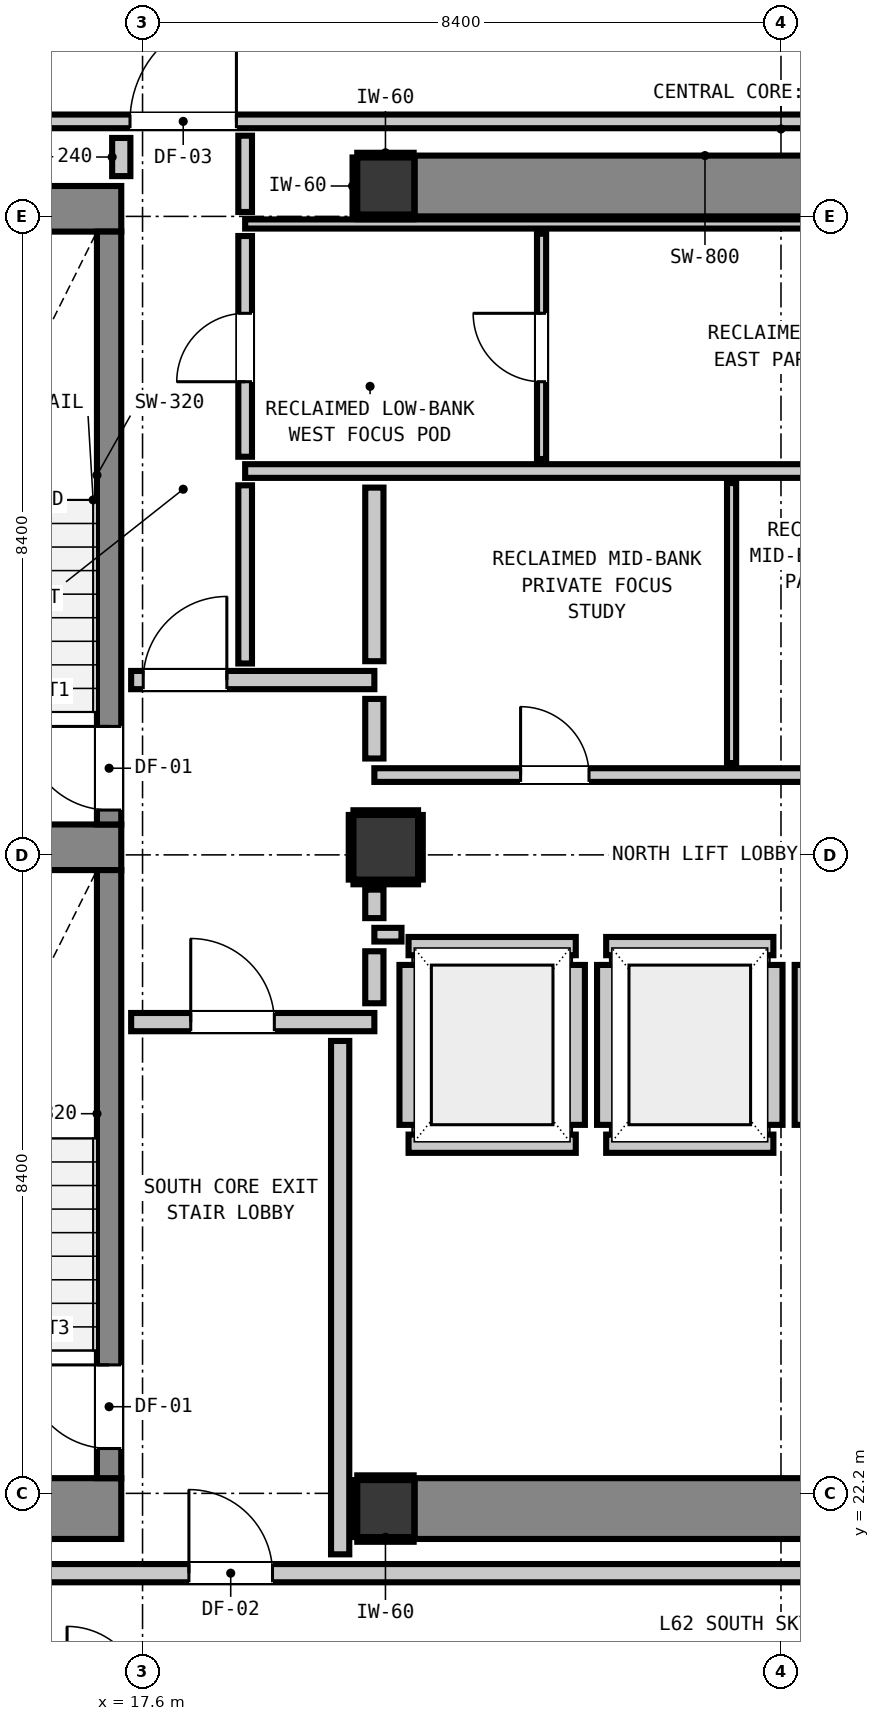
"""IFC4 building model, lengths in metres.
Left out: names, types, materials, properties, quantities, classifications, styles, units other than length and angle.
Written with IfcOpenShell. Run it as: python <this file> out.ifc"""

import sys

from ifc_helpers import new_model, si_unit, direction, frame, frame_2d, origin, origin_2d, place, context, subcontext, project, spatial, rectangle, extrude, element, fill, save


model = new_model("IFC4")
c1 = context("Model", 3, precision=1e-05, world=origin(), true_north=direction((0.0, 1.0)))
c2 = subcontext(c1, "Body", "Model", "MODEL_VIEW")
j1 = project(units=[si_unit("LENGTHUNIT", "METRE"), si_unit("PLANEANGLEUNIT", "RADIAN")], contexts=[c1])
p1 = place(None, origin())
s1 = spatial("IfcSite", under=j1, at=p1, CompositionType="ELEMENT")
p2 = place(p1, origin())
s2 = spatial("IfcBuilding", under=s1, at=p2, CompositionType="ELEMENT")
p3 = place(p2, frame((0.0, 0.0, 213.4)))
s3 = spatial("IfcBuildingStorey", under=s2, at=p3, CompositionType="ELEMENT", Elevation=213.4)
for number, where, z_axis, x_axis in (
    (1, (20.8, 22.0, 0.0), (0.0, 0.0, 1.0), (1.0, 0.0, 0.0)),
    (2, (20.8, 39.4, 0.0), (0.0, 0.0, 1.0), (1.0, 0.0, 0.0)),
):
    element("IfcColumn", number, at=place(p3, frame(where, z_axis=z_axis, x_axis=x_axis)), inside=s3, PredefinedType="COLUMN", context=c2, shape_type="SweptSolid", body=[
        extrude(rectangle(XDim=0.75, YDim=0.75, at=origin_2d()), origin(), (0.0, 0.0, 1.0), 3.32),
    ])
p4 = place(p3, frame((13.24, 22.0, 0.0), z_axis=(0.0, 0.0, 1.0), x_axis=(1.0, 0.0, 0.0)))
e3 = element("IfcWall", 3, at=p4, inside=s3, PredefinedType="SHEAR", context=c2, shape_type="SweptSolid", body=[
    extrude(rectangle(XDim=4.08, YDim=0.8, at=frame_2d((2.04, 0.0))), origin(), (0.0, 0.0, 1.0), 3.32),
])
p5 = place(p3, frame((13.24, 39.1, 0.0), z_axis=(0.0, 0.0, 1.0), x_axis=(1.0, 0.0, 0.0)))
e4 = element("IfcWall", 4, at=p5, inside=s3, PredefinedType="SHEAR", context=c2, shape_type="SweptSolid", body=[
    extrude(rectangle(XDim=4.08, YDim=0.6, at=frame_2d((2.04, 0.0))), origin(), (0.0, 0.0, 1.0), 3.32),
])
p6 = place(p3, frame((13.78, 30.7, 0.0), z_axis=(0.0, 0.0, 1.0), x_axis=(1.0, 0.0, 0.0)))
e5 = element("IfcWall", 5, at=p6, inside=s3, PredefinedType="SHEAR", context=c2, shape_type="SweptSolid", body=[
    extrude(rectangle(XDim=3.54, YDim=0.6, at=frame_2d((1.77, 0.0))), origin(), (0.0, 0.0, 1.0), 3.32),
])
for number, where, z_axis, x_axis in (
    (6, (21.18, 22.0, 0.0), (0.0, 0.0, 1.0), (1.0, 0.0, 0.0)),
    (7, (21.18, 39.4, 0.0), (0.0, 0.0, 1.0), (1.0, 0.0, 0.0)),
):
    element("IfcWall", number, at=place(p3, frame(where, z_axis=z_axis, x_axis=x_axis)), inside=s3, PredefinedType="SHEAR", context=c2, shape_type="SweptSolid", body=[
        extrude(rectangle(XDim=7.64, YDim=0.8, at=frame_2d((3.82, 0.0))), origin(), (0.0, 0.0, 1.0), 3.32),
    ])
p7 = place(p3, frame((17.16, 31.0, 0.0), z_axis=(0.0, 0.0, 1.0), x_axis=(0.0, 1.0, 0.0)))
e8 = element("IfcWall", 8, at=p7, inside=s3, PredefinedType="SHEAR", context=c2, shape_type="SweptSolid", body=[
    extrude(rectangle(XDim=7.8, YDim=0.32, at=frame_2d((3.9, 0.0))), origin(), (0.0, 0.0, 1.0), 3.32),
])
p8 = place(p7, frame((0.19, 0.0, 0.0)))
e9 = element("IfcOpeningElement", 9, at=p8, cuts=e8, PredefinedType="OPENING", context=c2, shape_type="SweptSolid", body=[
    extrude(rectangle(XDim=1.1, YDim=2.15, at=frame_2d((0.55, 1.075))), frame((0.0, 0.17, 0.0), z_axis=(0.0, -1.0, 0.0), x_axis=(1.0, 0.0, 0.0)), (0.0, 0.0, 1.0), 0.34),
])
p9 = place(p3, frame((17.16, 22.4, 0.0), z_axis=(0.0, 0.0, 1.0), x_axis=(0.0, 1.0, 0.0)))
e10 = element("IfcWall", 10, at=p9, inside=s3, PredefinedType="SHEAR", context=c2, shape_type="SweptSolid", body=[
    extrude(rectangle(XDim=8.0, YDim=0.32, at=frame_2d((4.0, 0.0))), origin(), (0.0, 0.0, 1.0), 3.32),
])
p10 = place(p9, frame((0.39, 0.0, 0.0)))
e11 = element("IfcOpeningElement", 11, at=p10, cuts=e10, PredefinedType="OPENING", context=c2, shape_type="SweptSolid", body=[
    extrude(rectangle(XDim=1.1, YDim=2.15, at=frame_2d((0.55, 1.075))), frame((0.0, 0.17, 0.0), z_axis=(0.0, -1.0, 0.0), x_axis=(1.0, 0.0, 0.0)), (0.0, 0.0, 1.0), 0.34),
])
p11 = place(p3, frame((20.8, 30.7, 0.0), z_axis=(0.0, 0.0, 1.0), x_axis=(1.0, 0.0, 0.0)))
e12 = element("IfcColumn", 12, at=p11, inside=s3, PredefinedType="COLUMN", context=c2, shape_type="SweptSolid", body=[
    extrude(rectangle(XDim=0.85, YDim=0.85, at=origin_2d()), origin(), (0.0, 0.0, 1.0), 3.32),
])
for number, where, z_axis, x_axis in (
    (13, (21.1, 26.8, 0.0), (0.0, 0.0, 1.0), (1.0, 0.0, 0.0)),
    (14, (21.1, 29.4, 0.0), (0.0, 0.0, 1.0), (1.0, 0.0, 0.0)),
):
    element("IfcWall", number, at=place(p3, frame(where, z_axis=z_axis, x_axis=x_axis)), inside=s3, PredefinedType="PARTITIONING", context=c2, shape_type="SweptSolid", body=[
        extrude(rectangle(XDim=2.2, YDim=0.24, at=frame_2d((1.1, 0.0))), origin(), (0.0, 0.0, 1.0), 3.1),
    ])
p12 = place(p3, frame((21.1, 27.048, 0.0), z_axis=(0.0, 0.0, 1.0), x_axis=(0.0, 1.0, 0.0)))
e15 = element("IfcWall", 15, at=p12, inside=s3, PredefinedType="PARTITIONING", context=c2, shape_type="SweptSolid", body=[
    extrude(rectangle(XDim=2.104, YDim=0.24, at=frame_2d((1.052, 0.0))), origin(), (0.0, 0.0, 1.0), 2.335),
])
p13 = place(p3, frame((23.3, 27.048, 0.0), z_axis=(0.0, 0.0, 1.0), x_axis=(0.0, 1.0, 0.0)))
e16 = element("IfcWall", 16, at=p13, inside=s3, PredefinedType="PARTITIONING", context=c2, shape_type="SweptSolid", body=[
    extrude(rectangle(XDim=2.104, YDim=0.24, at=frame_2d((1.052, 0.0))), origin(), (0.0, 0.0, 1.0), 3.1),
])
for number, where, z_axis, x_axis in (
    (17, (23.7, 26.8, 0.0), (0.0, 0.0, 1.0), (1.0, 0.0, 0.0)),
    (18, (23.7, 29.4, 0.0), (0.0, 0.0, 1.0), (1.0, 0.0, 0.0)),
):
    element("IfcWall", number, at=place(p3, frame(where, z_axis=z_axis, x_axis=x_axis)), inside=s3, PredefinedType="PARTITIONING", context=c2, shape_type="SweptSolid", body=[
        extrude(rectangle(XDim=2.2, YDim=0.24, at=frame_2d((1.1, 0.0))), origin(), (0.0, 0.0, 1.0), 3.1),
    ])
for number, where, z_axis, x_axis in (
    (19, (23.7, 27.048, 0.0), (0.0, 0.0, 1.0), (0.0, 1.0, 0.0)),
    (20, (25.9, 27.048, 0.0), (0.0, 0.0, 1.0), (0.0, 1.0, 0.0)),
    (21, (26.3, 27.048, 0.0), (0.0, 0.0, 1.0), (0.0, 1.0, 0.0)),
):
    element("IfcWall", number, at=place(p3, frame(where, z_axis=z_axis, x_axis=x_axis)), inside=s3, PredefinedType="PARTITIONING", context=c2, shape_type="SweptSolid", body=[
        extrude(rectangle(XDim=2.104, YDim=0.24, at=frame_2d((1.052, 0.0))), origin(), (0.0, 0.0, 1.0), 3.1),
    ])
p14 = place(p3, frame((10.787, 21.15, 0.0), z_axis=(0.0, 0.0, 1.0), x_axis=(1.0, 0.0, 0.0)))
e22 = element("IfcWall", 22, at=p14, inside=s3, PredefinedType="PARTITIONING", context=c2, shape_type="SweptSolid", body=[
    extrude(rectangle(XDim=36.626, YDim=0.24, at=frame_2d((18.313, 0.0))), origin(), (0.0, 0.0, 1.0), 3.1),
])
p15 = place(p14, frame((7.423, 0.0, 0.0)))
e23 = element("IfcOpeningElement", 23, at=p15, cuts=e22, PredefinedType="OPENING", context=c2, shape_type="SweptSolid", body=[
    extrude(rectangle(XDim=1.1, YDim=2.15, at=frame_2d((0.55, 1.075))), frame((0.0, 0.13, 0.0), z_axis=(0.0, -1.0, 0.0), x_axis=(1.0, 0.0, 0.0)), (0.0, 0.0, 1.0), 0.26),
])
p16 = place(p14, frame((31.314, 0.0, 0.0)))
e24 = element("IfcOpeningElement", 24, at=p16, cuts=e22, PredefinedType="OPENING", context=c2, shape_type="SweptSolid", body=[
    extrude(rectangle(XDim=0.9, YDim=2.1, at=frame_2d((0.45, 1.05))), frame((0.0, 0.13, 0.0), z_axis=(0.0, -1.0, 0.0), x_axis=(1.0, 0.0, 0.0)), (0.0, 0.0, 1.0), 0.26),
])
p17 = place(p3, frame((17.45, 28.4, 0.0), z_axis=(0.0, 0.0, 1.0), x_axis=(1.0, 0.0, 0.0)))
e25 = element("IfcWall", 25, at=p17, inside=s3, PredefinedType="PARTITIONING", context=c2, shape_type="SweptSolid", body=[
    extrude(rectangle(XDim=3.2, YDim=0.24, at=frame_2d((1.6, 0.0))), origin(), (0.0, 0.0, 1.0), 3.1),
])
p18 = place(p17, frame((0.784, 0.0, 0.0)))
e26 = element("IfcOpeningElement", 26, at=p18, cuts=e25, PredefinedType="OPENING", context=c2, shape_type="SweptSolid", body=[
    extrude(rectangle(XDim=1.1, YDim=2.15, at=frame_2d((0.55, 1.075))), frame((0.0, 0.13, 0.0), z_axis=(0.0, -1.0, 0.0), x_axis=(1.0, 0.0, 0.0)), (0.0, 0.0, 1.0), 0.26),
])
p19 = place(p3, frame((17.45, 32.9, 0.0), z_axis=(0.0, 0.0, 1.0), x_axis=(1.0, 0.0, 0.0)))
e27 = element("IfcWall", 27, at=p19, inside=s3, PredefinedType="PARTITIONING", context=c2, shape_type="SweptSolid", body=[
    extrude(rectangle(XDim=3.2, YDim=0.24, at=frame_2d((1.6, 0.0))), origin(), (0.0, 0.0, 1.0), 3.1),
])
p20 = place(p19, frame((0.159, 0.0, 0.0)))
e28 = element("IfcOpeningElement", 28, at=p20, cuts=e27, PredefinedType="OPENING", context=c2, shape_type="SweptSolid", body=[
    extrude(rectangle(XDim=1.1, YDim=2.15, at=frame_2d((0.55, 1.075))), frame((0.0, 0.13, 0.0), z_axis=(0.0, -1.0, 0.0), x_axis=(1.0, 0.0, 0.0)), (0.0, 0.0, 1.0), 0.26),
])
p21 = place(p3, frame((20.65, 29.55, 0.0), z_axis=(0.0, 0.0, 1.0), x_axis=(1.0, 0.0, 0.0)))
e29 = element("IfcWall", 29, at=p21, inside=s3, PredefinedType="PARTITIONING", context=c2, shape_type="SweptSolid", body=[
    extrude(rectangle(XDim=0.357, YDim=0.18, at=frame_2d((0.179, 0.0))), origin(), (0.0, 0.0, 1.0), 3.1),
])
p22 = place(p3, frame((20.65, 31.65, 0.0), z_axis=(0.0, 0.0, 1.0), x_axis=(1.0, 0.0, 0.0)))
e30 = element("IfcWall", 30, at=p22, inside=s3, PredefinedType="PARTITIONING", context=c2, shape_type="SweptSolid", body=[
    extrude(rectangle(XDim=7.7, YDim=0.18, at=frame_2d((3.85, 0.0))), origin(), (0.0, 0.0, 1.0), 3.1),
])
p23 = place(p22, frame((1.924, 0.0, 0.0)))
e31 = element("IfcOpeningElement", 31, at=p23, cuts=e30, PredefinedType="OPENING", context=c2, shape_type="SweptSolid", body=[
    extrude(rectangle(XDim=0.9, YDim=2.1, at=frame_2d((0.45, 1.05))), frame((0.0, 0.1, 0.0), z_axis=(0.0, -1.0, 0.0), x_axis=(1.0, 0.0, 0.0)), (0.0, 0.0, 1.0), 0.2),
])
p24 = place(p3, frame((18.95, 35.65, 0.0), z_axis=(0.0, 0.0, 1.0), x_axis=(1.0, 0.0, 0.0)))
e32 = element("IfcWall", 32, at=p24, inside=s3, PredefinedType="PARTITIONING", context=c2, shape_type="SweptSolid", body=[
    extrude(rectangle(XDim=11.025, YDim=0.18, at=frame_2d((5.513, 0.0))), origin(), (0.0, 0.0, 1.0), 3.1),
])
p25 = place(p3, frame((10.787, 40.25, 0.0), z_axis=(0.0, 0.0, 1.0), x_axis=(1.0, 0.0, 0.0)))
e33 = element("IfcWall", 33, at=p25, inside=s3, PredefinedType="PARTITIONING", context=c2, shape_type="SweptSolid", body=[
    extrude(rectangle(XDim=26.102, YDim=0.18, at=frame_2d((13.051, 0.0))), origin(), (0.0, 0.0, 1.0), 3.1),
])
p26 = place(p25, frame((6.648, 0.0, 0.0)))
e34 = element("IfcOpeningElement", 34, at=p26, cuts=e33, PredefinedType="OPENING", context=c2, shape_type="SweptSolid", body=[
    extrude(rectangle(XDim=1.4, YDim=2.15, at=frame_2d((0.7, 1.075))), frame((0.0, 0.1, 0.0), z_axis=(0.0, -1.0, 0.0), x_axis=(1.0, 0.0, 0.0)), (0.0, 0.0, 1.0), 0.2),
])
p27 = place(p3, frame((18.95, 38.9, 0.0), z_axis=(0.0, 0.0, 1.0), x_axis=(1.0, 0.0, 0.0)))
e35 = element("IfcWall", 35, at=p27, inside=s3, PredefinedType="PARTITIONING", context=c2, shape_type="SweptSolid", body=[
    extrude(rectangle(XDim=11.025, YDim=0.12, at=frame_2d((5.513, 0.0))), origin(), (0.0, 0.0, 1.0), 3.1),
])
p28 = place(p3, frame((17.32, 39.53, 0.0), z_axis=(0.0, 0.0, 1.0), x_axis=(0.0, 1.0, 0.0)))
e36 = element("IfcWall", 36, at=p28, inside=s3, PredefinedType="PARTITIONING", context=c2, shape_type="SweptSolid", body=[
    extrude(rectangle(XDim=0.502, YDim=0.24, at=frame_2d((0.251, 0.0))), origin(), (0.0, 0.0, 1.0), 3.1),
])
p29 = place(p3, frame((20.2, 21.398, 0.0), z_axis=(0.0, 0.0, 1.0), x_axis=(0.0, 1.0, 0.0)))
e37 = element("IfcWall", 37, at=p29, inside=s3, PredefinedType="PARTITIONING", context=c2, shape_type="SweptSolid", body=[
    extrude(rectangle(XDim=6.754, YDim=0.24, at=frame_2d((3.377, 0.0))), origin(), (0.0, 0.0, 1.0), 3.1),
])
p30 = place(p3, frame((20.65, 28.648, 0.0), z_axis=(0.0, 0.0, 1.0), x_axis=(0.0, 1.0, 0.0)))
e38 = element("IfcWall", 38, at=p30, inside=s3, PredefinedType="PARTITIONING", context=c2, shape_type="SweptSolid", body=[
    extrude(rectangle(XDim=0.684, YDim=0.24, at=frame_2d((0.342, 0.0))), origin(), (0.0, 0.0, 1.0), 2.335),
])
p31 = place(p3, frame((20.65, 29.768, 0.0), z_axis=(0.0, 0.0, 1.0), x_axis=(0.0, 1.0, 0.0)))
e39 = element("IfcWall", 39, at=p31, inside=s3, PredefinedType="PARTITIONING", context=c2, shape_type="SweptSolid", body=[
    extrude(rectangle(XDim=0.375, YDim=0.24, at=frame_2d((0.188, 0.0))), origin(), (0.0, 0.0, 1.0), 2.335),
])
p32 = place(p3, frame((20.65, 31.868, 0.0), z_axis=(0.0, 0.0, 1.0), x_axis=(0.0, 1.0, 0.0)))
e40 = element("IfcWall", 40, at=p32, inside=s3, PredefinedType="PARTITIONING", context=c2, shape_type="SweptSolid", body=[
    extrude(rectangle(XDim=0.784, YDim=0.24, at=frame_2d((0.392, 0.0))), origin(), (0.0, 0.0, 1.0), 2.335),
])
p33 = place(p3, frame((20.65, 33.148, 0.0), z_axis=(0.0, 0.0, 1.0), x_axis=(0.0, 1.0, 0.0)))
e41 = element("IfcWall", 41, at=p33, inside=s3, PredefinedType="PARTITIONING", context=c2, shape_type="SweptSolid", body=[
    extrude(rectangle(XDim=2.284, YDim=0.24, at=frame_2d((1.142, 0.0))), origin(), (0.0, 0.0, 1.0), 2.335),
])
p34 = place(p3, frame((18.95, 33.118, 0.0), z_axis=(0.0, 0.0, 1.0), x_axis=(0.0, 1.0, 0.0)))
e42 = element("IfcWall", 42, at=p34, inside=s3, PredefinedType="PARTITIONING", context=c2, shape_type="SweptSolid", body=[
    extrude(rectangle(XDim=2.344, YDim=0.18, at=frame_2d((1.172, 0.0))), origin(), (0.0, 0.0, 1.0), 3.1),
])
p35 = place(p3, frame((18.95, 35.838, 0.0), z_axis=(0.0, 0.0, 1.0), x_axis=(0.0, 1.0, 0.0)))
e43 = element("IfcWall", 43, at=p35, inside=s3, PredefinedType="PARTITIONING", context=c2, shape_type="SweptSolid", body=[
    extrude(rectangle(XDim=2.904, YDim=0.18, at=frame_2d((1.452, 0.0))), origin(), (0.0, 0.0, 1.0), 3.1),
])
p36 = place(p35, frame((0.987, 0.0, 0.0)))
e44 = element("IfcOpeningElement", 44, at=p36, cuts=e43, PredefinedType="OPENING", context=c2, shape_type="SweptSolid", body=[
    extrude(rectangle(XDim=0.9, YDim=2.1, at=frame_2d((0.45, 1.05))), frame((0.0, 0.1, 0.0), z_axis=(0.0, -1.0, 0.0), x_axis=(1.0, 0.0, 0.0)), (0.0, 0.0, 1.0), 0.2),
])
p37 = place(p3, frame((18.95, 39.058, 0.0), z_axis=(0.0, 0.0, 1.0), x_axis=(0.0, 1.0, 0.0)))
e45 = element("IfcWall", 45, at=p37, inside=s3, PredefinedType="PARTITIONING", context=c2, shape_type="SweptSolid", body=[
    extrude(rectangle(XDim=1.004, YDim=0.18, at=frame_2d((0.502, 0.0))), origin(), (0.0, 0.0, 1.0), 3.1),
])
p38 = place(p3, frame((22.85, 35.808, 0.0), z_axis=(0.0, 0.0, 1.0), x_axis=(0.0, 1.0, 0.0)))
e46 = element("IfcWall", 46, at=p38, inside=s3, PredefinedType="PARTITIONING", context=c2, shape_type="SweptSolid", body=[
    extrude(rectangle(XDim=2.964, YDim=0.12, at=frame_2d((1.482, 0.0))), origin(), (0.0, 0.0, 1.0), 3.1),
])
p39 = place(p38, frame((1.017, 0.0, 0.0)))
e47 = element("IfcOpeningElement", 47, at=p39, cuts=e46, PredefinedType="OPENING", context=c2, shape_type="SweptSolid", body=[
    extrude(rectangle(XDim=0.9, YDim=2.1, at=frame_2d((0.45, 1.05))), frame((0.0, 0.07, 0.0), z_axis=(0.0, -1.0, 0.0), x_axis=(1.0, 0.0, 0.0)), (0.0, 0.0, 1.0), 0.14),
])
p40 = place(p3, frame((25.35, 31.808, 0.0), z_axis=(0.0, 0.0, 1.0), x_axis=(0.0, 1.0, 0.0)))
e48 = element("IfcWall", 48, at=p40, inside=s3, PredefinedType="PARTITIONING", context=c2, shape_type="SweptSolid", body=[
    extrude(rectangle(XDim=3.684, YDim=0.12, at=frame_2d((1.842, 0.0))), origin(), (0.0, 0.0, 1.0), 3.1),
])
for number, where, z_axis, x_axis in (
    (49, (20.425, 21.593, 0.0), (0.0, 0.0, 1.0), (1.0, 0.0, 0.0)),
    (50, (20.425, 22.407, 0.0), (0.0, 0.0, 1.0), (1.0, 0.0, 0.0)),
):
    element("IfcWall", number, at=place(p3, frame(where, z_axis=z_axis, x_axis=x_axis)), inside=s3, PredefinedType="PARTITIONING", context=c2, shape_type="SweptSolid", body=[
        extrude(rectangle(XDim=0.742, YDim=0.06, at=frame_2d((0.371, 0.0))), origin(), (0.0, 0.0, 1.0), 1.45),
    ])
p41 = place(p3, frame((20.393, 21.625, 0.0), z_axis=(0.0, 0.0, 1.0), x_axis=(0.0, 1.0, 0.0)))
e51 = element("IfcWall", 51, at=p41, inside=s3, PredefinedType="PARTITIONING", context=c2, shape_type="SweptSolid", body=[
    extrude(rectangle(XDim=0.75, YDim=0.06, at=frame_2d((0.375, 0.0))), origin(), (0.0, 0.0, 1.0), 1.45),
])
for number, where, z_axis, x_axis in (
    (52, (20.425, 38.993, 0.0), (0.0, 0.0, 1.0), (1.0, 0.0, 0.0)),
    (53, (20.425, 39.807, 0.0), (0.0, 0.0, 1.0), (1.0, 0.0, 0.0)),
):
    element("IfcWall", number, at=place(p3, frame(where, z_axis=z_axis, x_axis=x_axis)), inside=s3, PredefinedType="PARTITIONING", context=c2, shape_type="SweptSolid", body=[
        extrude(rectangle(XDim=0.742, YDim=0.06, at=frame_2d((0.371, 0.0))), origin(), (0.0, 0.0, 1.0), 1.45),
    ])
p42 = place(p3, frame((20.393, 39.025, 0.0), z_axis=(0.0, 0.0, 1.0), x_axis=(0.0, 1.0, 0.0)))
e54 = element("IfcWall", 54, at=p42, inside=s3, PredefinedType="PARTITIONING", context=c2, shape_type="SweptSolid", body=[
    extrude(rectangle(XDim=0.75, YDim=0.06, at=frame_2d((0.375, 0.0))), origin(), (0.0, 0.0, 1.0), 1.45),
])
for number, where, z_axis, x_axis in (
    (55, (20.375, 30.243, 0.0), (0.0, 0.0, 1.0), (1.0, 0.0, 0.0)),
    (56, (20.375, 31.157, 0.0), (0.0, 0.0, 1.0), (1.0, 0.0, 0.0)),
    (57, (20.343, 30.275, 0.0), (0.0, 0.0, 1.0), (0.0, 1.0, 0.0)),
    (58, (21.257, 30.275, 0.0), (0.0, 0.0, 1.0), (0.0, 1.0, 0.0)),
):
    element("IfcWall", number, at=place(p3, frame(where, z_axis=z_axis, x_axis=x_axis)), inside=s3, PredefinedType="PARTITIONING", context=c2, shape_type="SweptSolid", body=[
        extrude(rectangle(XDim=0.85, YDim=0.06, at=frame_2d((0.425, 0.0))), origin(), (0.0, 0.0, 1.0), 1.45),
    ])
p43 = place(p8, origin())
e59 = element("IfcDoor", 59, at=p43, inside=s3, OperationType="SINGLE_SWING_RIGHT", PredefinedType="DOOR", context=c2, shape_type="SweptSolid", body=[
    extrude(rectangle(XDim=1.1, YDim=2.15, at=frame_2d((0.55, 1.075))), frame((0.0, 0.025, 0.0), z_axis=(0.0, -1.0, 0.0), x_axis=(1.0, 0.0, 0.0)), (0.0, 0.0, 1.0), 0.05),
])
fill(e9, e59)
p44 = place(p10, origin())
e60 = element("IfcDoor", 60, at=p44, inside=s3, OperationType="SINGLE_SWING_RIGHT", PredefinedType="DOOR", context=c2, shape_type="SweptSolid", body=[
    extrude(rectangle(XDim=1.1, YDim=2.15, at=frame_2d((0.55, 1.075))), frame((0.0, 0.025, 0.0), z_axis=(0.0, -1.0, 0.0), x_axis=(1.0, 0.0, 0.0)), (0.0, 0.0, 1.0), 0.05),
])
fill(e11, e60)
p45 = place(p18, origin())
e61 = element("IfcDoor", 61, at=p45, inside=s3, OperationType="SINGLE_SWING_LEFT", PredefinedType="DOOR", context=c2, shape_type="SweptSolid", body=[
    extrude(rectangle(XDim=1.1, YDim=2.15, at=frame_2d((0.55, 1.075))), frame((0.0, 0.025, 0.0), z_axis=(0.0, -1.0, 0.0), x_axis=(1.0, 0.0, 0.0)), (0.0, 0.0, 1.0), 0.05),
])
fill(e26, e61)
p46 = place(p20, origin())
e62 = element("IfcDoor", 62, at=p46, inside=s3, OperationType="SINGLE_SWING_RIGHT", PredefinedType="DOOR", context=c2, shape_type="SweptSolid", body=[
    extrude(rectangle(XDim=1.1, YDim=2.15, at=frame_2d((0.55, 1.075))), frame((0.0, 0.025, 0.0), z_axis=(0.0, -1.0, 0.0), x_axis=(1.0, 0.0, 0.0)), (0.0, 0.0, 1.0), 0.05),
])
fill(e28, e62)
p47 = place(p15, origin())
e63 = element("IfcDoor", 63, at=p47, inside=s3, OperationType="SINGLE_SWING_LEFT", PredefinedType="DOOR", context=c2, shape_type="SweptSolid", body=[
    extrude(rectangle(XDim=1.1, YDim=2.15, at=frame_2d((0.55, 1.075))), frame((0.0, 0.025, 0.0), z_axis=(0.0, -1.0, 0.0), x_axis=(1.0, 0.0, 0.0)), (0.0, 0.0, 1.0), 0.05),
])
fill(e23, e63)
p48 = place(p26, origin())
e64 = element("IfcDoor", 64, at=p48, inside=s3, OperationType="SINGLE_SWING_RIGHT", PredefinedType="DOOR", context=c2, shape_type="SweptSolid", body=[
    extrude(rectangle(XDim=1.4, YDim=2.15, at=frame_2d((0.7, 1.075))), frame((0.0, 0.025, 0.0), z_axis=(0.0, -1.0, 0.0), x_axis=(1.0, 0.0, 0.0)), (0.0, 0.0, 1.0), 0.05),
])
fill(e34, e64)
p49 = place(p36, origin())
e65 = element("IfcDoor", 65, at=p49, inside=s3, OperationType="SINGLE_SWING_LEFT", PredefinedType="DOOR", context=c2, shape_type="SweptSolid", body=[
    extrude(rectangle(XDim=0.9, YDim=2.1, at=frame_2d((0.45, 1.05))), frame((0.0, 0.025, 0.0), z_axis=(0.0, -1.0, 0.0), x_axis=(1.0, 0.0, 0.0)), (0.0, 0.0, 1.0), 0.05),
])
fill(e44, e65)
p50 = place(p39, origin())
e66 = element("IfcDoor", 66, at=p50, inside=s3, OperationType="SINGLE_SWING_RIGHT", PredefinedType="DOOR", context=c2, shape_type="SweptSolid", body=[
    extrude(rectangle(XDim=0.9, YDim=2.1, at=frame_2d((0.45, 1.05))), frame((0.0, 0.025, 0.0), z_axis=(0.0, -1.0, 0.0), x_axis=(1.0, 0.0, 0.0)), (0.0, 0.0, 1.0), 0.05),
])
fill(e47, e66)
p51 = place(p23, origin())
e67 = element("IfcDoor", 67, at=p51, inside=s3, OperationType="SINGLE_SWING_LEFT", PredefinedType="DOOR", context=c2, shape_type="SweptSolid", body=[
    extrude(rectangle(XDim=0.9, YDim=2.1, at=frame_2d((0.45, 1.05))), frame((0.0, 0.025, 0.0), z_axis=(0.0, -1.0, 0.0), x_axis=(1.0, 0.0, 0.0)), (0.0, 0.0, 1.0), 0.05),
])
fill(e31, e67)
save(model, sys.argv[1])
